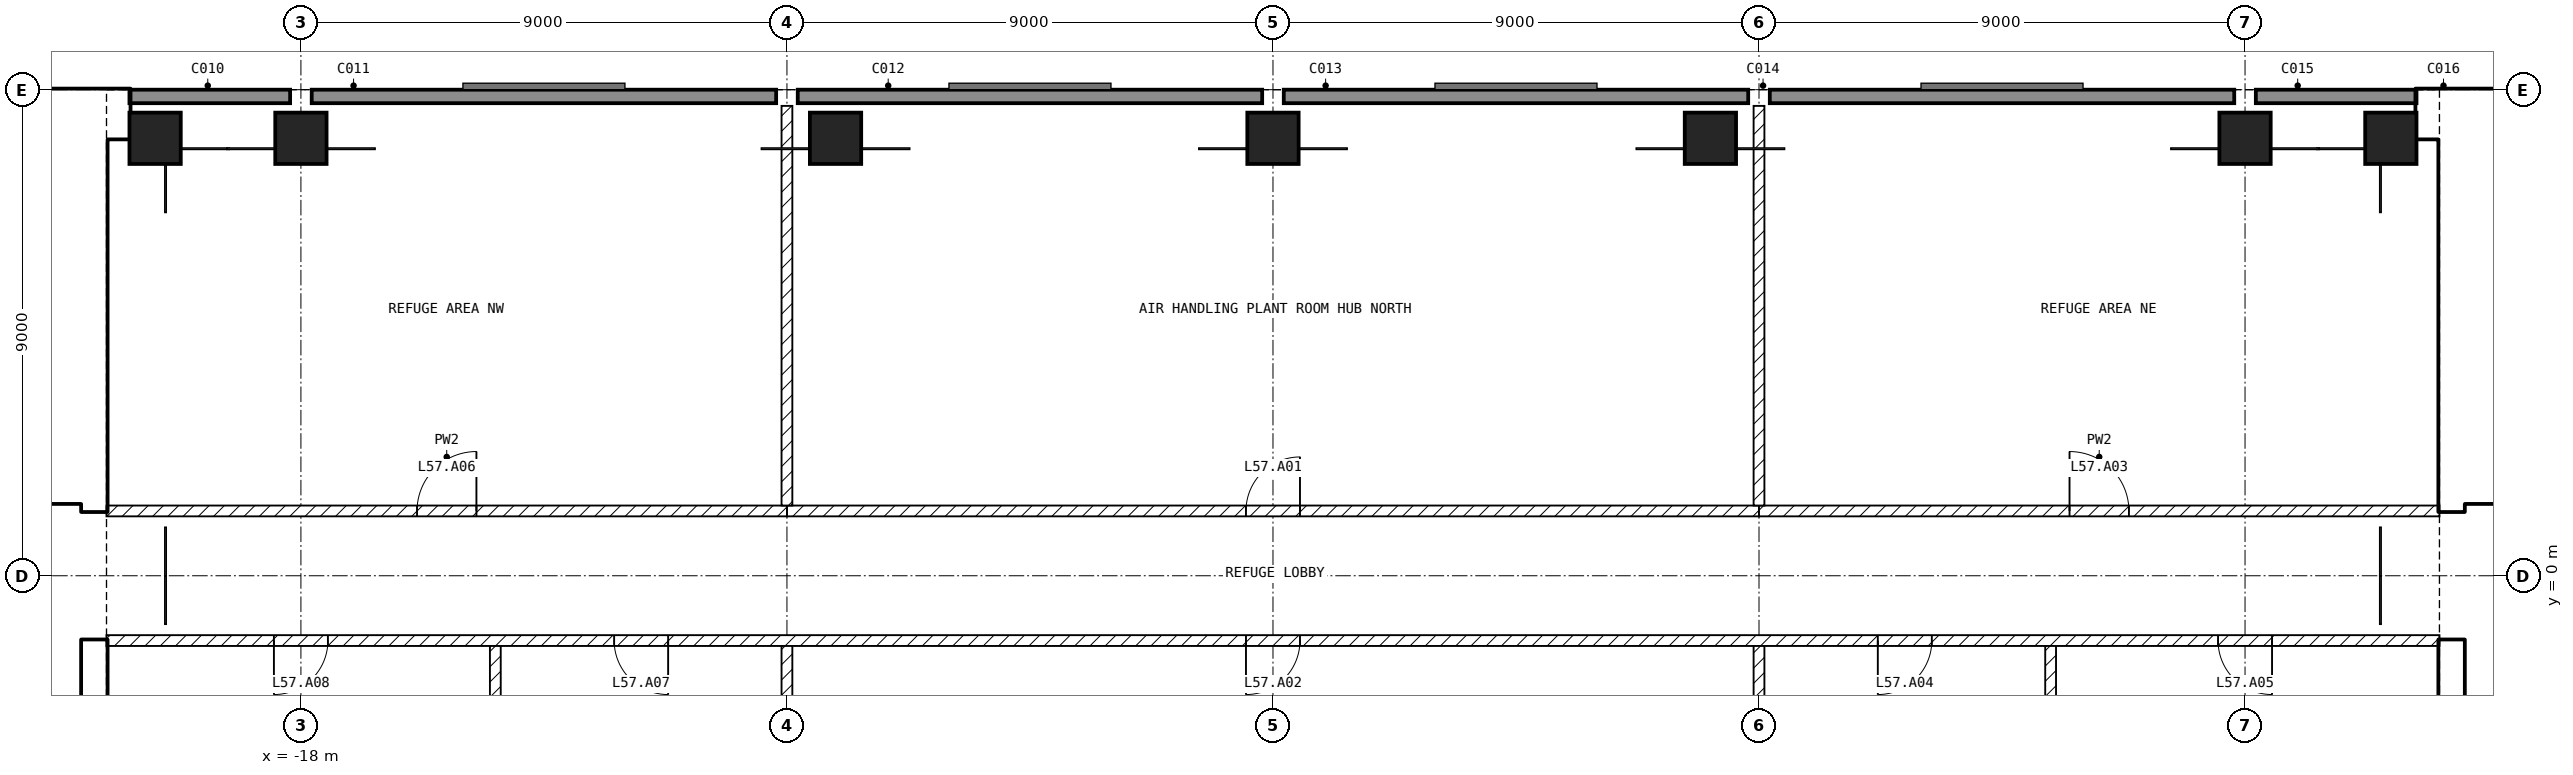
"""IFC4 building model, lengths in metres.
Left out: names, types, materials, properties, quantities, classifications, styles, units other than length and angle.
Written with IfcOpenShell. Run it as: python <this file> out.ifc"""

import sys

from ifc_helpers import new_model, si_unit, direction, frame, frame_2d, origin, origin_2d, place, context, subcontext, project, spatial, rectangle, extrude, element, fill, save


model = new_model("IFC4")
c1 = context("Model", 3, precision=1e-05, world=origin(), true_north=direction((0.0, 1.0)))
c2 = subcontext(c1, "Body", "Model", "MODEL_VIEW")
j1 = project(units=[si_unit("LENGTHUNIT", "METRE"), si_unit("PLANEANGLEUNIT", "RADIAN")], contexts=[c1])
p1 = place(None, origin())
s1 = spatial("IfcSite", under=j1, at=p1, CompositionType="ELEMENT")
p2 = place(p1, origin())
s2 = spatial("IfcBuilding", under=s1, at=p2, CompositionType="ELEMENT")
p3 = place(p2, frame((0.0, 0.0, 228.0)))
s3 = spatial("IfcBuildingStorey", under=s2, at=p3, CompositionType="ELEMENT", Elevation=228.0)
for number, where, z_axis, x_axis in (
    (1, (-20.7, 8.1, -0.45), (0.0, 0.0, 1.0), (1.0, 0.0, 0.0)),
    (2, (-18.0, 8.1, -0.45), (0.0, 0.0, 1.0), (1.0, 0.0, 0.0)),
    (3, (-8.1, 8.1, -0.45), (0.0, 0.0, 1.0), (1.0, 0.0, 0.0)),
    (4, (0.0, 8.1, -0.45), (0.0, 0.0, 1.0), (1.0, 0.0, 0.0)),
    (5, (8.1, 8.1, -0.45), (0.0, 0.0, 1.0), (1.0, 0.0, 0.0)),
    (6, (18.0, 8.1, -0.45), (0.0, 0.0, 1.0), (1.0, 0.0, 0.0)),
    (7, (20.7, 8.1, -0.45), (0.0, 0.0, 1.0), (1.0, 0.0, 0.0)),
):
    element("IfcColumn", number, at=place(p3, frame(where, z_axis=z_axis, x_axis=x_axis)), inside=s3, PredefinedType="COLUMN", context=c2, shape_type="SweptSolid", body=[
        extrude(rectangle(XDim=0.95, YDim=0.95, at=origin_2d()), origin(), (0.0, 0.0, 1.0), 4.7),
    ])
p4 = place(p3, frame((21.175, 8.875, 0.0), z_axis=(0.0, 0.0, 1.0), x_axis=(-1.0, 0.0, 0.0)))
e8 = element("IfcWall", 8, at=p4, inside=s3, PredefinedType="SOLIDWALL", context=c2, shape_type="SweptSolid", body=[
    extrude(rectangle(XDim=2.975, YDim=0.25, at=frame_2d((1.488, 0.0))), origin(), (0.0, 0.0, 1.0), 4.25),
])
for number, where, z_axis, x_axis in (
    (9, (17.8, 8.875, 0.0), (0.0, 0.0, 1.0), (-1.0, 0.0, 0.0)),
    (10, (8.8, 8.875, 0.0), (0.0, 0.0, 1.0), (-1.0, 0.0, 0.0)),
    (11, (-0.2, 8.875, 0.0), (0.0, 0.0, 1.0), (-1.0, 0.0, 0.0)),
    (12, (-9.2, 8.875, 0.0), (0.0, 0.0, 1.0), (-1.0, 0.0, 0.0)),
):
    element("IfcWall", number, at=place(p3, frame(where, z_axis=z_axis, x_axis=x_axis)), inside=s3, PredefinedType="SOLIDWALL", context=c2, shape_type="SweptSolid", body=[
        extrude(rectangle(XDim=8.6, YDim=0.25, at=frame_2d((4.3, 0.0))), origin(), (0.0, 0.0, 1.0), 4.25),
    ])
p5 = place(p3, frame((-18.2, 8.875, 0.0), z_axis=(0.0, 0.0, 1.0), x_axis=(-1.0, 0.0, 0.0)))
e13 = element("IfcWall", 13, at=p5, inside=s3, PredefinedType="SOLIDWALL", context=c2, shape_type="SweptSolid", body=[
    extrude(rectangle(XDim=2.975, YDim=0.25, at=frame_2d((1.488, 0.0))), origin(), (0.0, 0.0, 1.0), 4.25),
])
p6 = place(p3, frame((21.175, 8.55, 0.0), z_axis=(0.0, 0.0, 1.0), x_axis=(1.0, 0.0, 0.0)))
e14 = element("IfcWall", 14, at=p6, inside=s3, PredefinedType="SHEAR", context=c2, shape_type="SweptSolid", body=[
    extrude(rectangle(XDim=8.575, YDim=0.9, at=frame_2d((4.288, 0.0))), origin(), (0.0, 0.0, 1.0), 4.25),
])
for number, where, z_axis, x_axis in (
    (15, (21.825, -8.1, 0.0), (0.0, 0.0, 1.0), (0.0, 1.0, 0.0)),
    (16, (21.825, 1.2, 0.0), (0.0, 0.0, 1.0), (0.0, 1.0, 0.0)),
):
    element("IfcWall", number, at=place(p3, frame(where, z_axis=z_axis, x_axis=x_axis)), inside=s3, PredefinedType="SHEAR", context=c2, shape_type="SweptSolid", body=[
        extrude(rectangle(XDim=6.9, YDim=0.45, at=frame_2d((3.45, 0.0))), origin(), (0.0, 0.0, 1.0), 4.25),
    ])
p7 = place(p3, frame((22.05, 1.45, 0.0), z_axis=(0.0, 0.0, 1.0), x_axis=(1.0, 0.0, 0.0)))
e17 = element("IfcWall", 17, at=p7, inside=s3, PredefinedType="SOLIDWALL", context=c2, shape_type="SweptSolid", body=[
    extrude(rectangle(XDim=11.3, YDim=0.2, at=frame_2d((5.65, 0.0))), origin(), (0.0, 0.0, 1.0), 4.25),
])
p8 = place(p7, frame((0.75, 0.0, 0.0)))
e18 = element("IfcOpeningElement", 18, at=p8, cuts=e17, PredefinedType="OPENING", context=c2, shape_type="SweptSolid", body=[
    extrude(rectangle(XDim=1.0, YDim=2.1, at=frame_2d((0.5, 1.05))), frame((0.0, 0.11, 0.0), z_axis=(0.0, -1.0, 0.0), x_axis=(1.0, 0.0, 0.0)), (0.0, 0.0, 1.0), 0.22),
])
p9 = place(p7, frame((3.25, 0.0, 0.0)))
e19 = element("IfcOpeningElement", 19, at=p9, cuts=e17, PredefinedType="OPENING", context=c2, shape_type="SweptSolid", body=[
    extrude(rectangle(XDim=1.0, YDim=2.1, at=frame_2d((0.5, 1.05))), frame((0.0, 0.11, 0.0), z_axis=(0.0, -1.0, 0.0), x_axis=(1.0, 0.0, 0.0)), (0.0, 0.0, 1.0), 0.22),
])
p10 = place(p7, frame((9.225, 0.0, 0.0)))
e20 = element("IfcOpeningElement", 20, at=p10, cuts=e17, PredefinedType="OPENING", context=c2, shape_type="SweptSolid", body=[
    extrude(rectangle(XDim=0.9, YDim=2.1, at=frame_2d((0.45, 1.05))), frame((0.0, 0.11, 0.0), z_axis=(0.0, -1.0, 0.0), x_axis=(1.0, 0.0, 0.0)), (0.0, 0.0, 1.0), 0.22),
])
p11 = place(p3, frame((22.05, 5.15, 0.0), z_axis=(0.0, 0.0, 1.0), x_axis=(1.0, 0.0, 0.0)))
e21 = element("IfcWall", 21, at=p11, inside=s3, PredefinedType="SOLIDWALL", context=c2, shape_type="SweptSolid", body=[
    extrude(rectangle(XDim=6.3, YDim=0.2, at=frame_2d((3.15, 0.0))), origin(), (0.0, 0.0, 1.0), 4.25),
])
p12 = place(p11, frame((0.2, 0.0, 0.0)))
e22 = element("IfcOpeningElement", 22, at=p12, cuts=e21, PredefinedType="OPENING", context=c2, shape_type="SweptSolid", body=[
    extrude(rectangle(XDim=1.0, YDim=2.1, at=frame_2d((0.5, 1.05))), frame((0.0, 0.11, 0.0), z_axis=(0.0, -1.0, 0.0), x_axis=(1.0, 0.0, 0.0)), (0.0, 0.0, 1.0), 0.22),
])
p13 = place(p3, frame((-29.75, 8.55, 0.0), z_axis=(0.0, 0.0, 1.0), x_axis=(1.0, 0.0, 0.0)))
e23 = element("IfcWall", 23, at=p13, inside=s3, PredefinedType="SHEAR", context=c2, shape_type="SweptSolid", body=[
    extrude(rectangle(XDim=8.575, YDim=0.9, at=frame_2d((4.288, 0.0))), origin(), (0.0, 0.0, 1.0), 4.25),
])
for number, where, z_axis, x_axis in (
    (24, (-21.825, -8.1, 0.0), (0.0, 0.0, 1.0), (0.0, 1.0, 0.0)),
    (25, (-21.825, 1.2, 0.0), (0.0, 0.0, 1.0), (0.0, 1.0, 0.0)),
):
    element("IfcWall", number, at=place(p3, frame(where, z_axis=z_axis, x_axis=x_axis)), inside=s3, PredefinedType="SHEAR", context=c2, shape_type="SweptSolid", body=[
        extrude(rectangle(XDim=6.9, YDim=0.45, at=frame_2d((3.45, 0.0))), origin(), (0.0, 0.0, 1.0), 4.25),
    ])
p14 = place(p3, frame((-33.35, 1.45, 0.0), z_axis=(0.0, 0.0, 1.0), x_axis=(1.0, 0.0, 0.0)))
e26 = element("IfcWall", 26, at=p14, inside=s3, PredefinedType="SOLIDWALL", context=c2, shape_type="SweptSolid", body=[
    extrude(rectangle(XDim=11.3, YDim=0.2, at=frame_2d((5.65, 0.0))), origin(), (0.0, 0.0, 1.0), 4.25),
])
p15 = place(p14, frame((9.55, 0.0, 0.0)))
e27 = element("IfcOpeningElement", 27, at=p15, cuts=e26, PredefinedType="OPENING", context=c2, shape_type="SweptSolid", body=[
    extrude(rectangle(XDim=1.0, YDim=2.1, at=frame_2d((0.5, 1.05))), frame((0.0, 0.11, 0.0), z_axis=(0.0, -1.0, 0.0), x_axis=(1.0, 0.0, 0.0)), (0.0, 0.0, 1.0), 0.22),
])
p16 = place(p14, frame((7.05, 0.0, 0.0)))
e28 = element("IfcOpeningElement", 28, at=p16, cuts=e26, PredefinedType="OPENING", context=c2, shape_type="SweptSolid", body=[
    extrude(rectangle(XDim=1.0, YDim=2.1, at=frame_2d((0.5, 1.05))), frame((0.0, 0.11, 0.0), z_axis=(0.0, -1.0, 0.0), x_axis=(1.0, 0.0, 0.0)), (0.0, 0.0, 1.0), 0.22),
])
p17 = place(p14, frame((1.175, 0.0, 0.0)))
e29 = element("IfcOpeningElement", 29, at=p17, cuts=e26, PredefinedType="OPENING", context=c2, shape_type="SweptSolid", body=[
    extrude(rectangle(XDim=0.9, YDim=2.1, at=frame_2d((0.45, 1.05))), frame((0.0, 0.11, 0.0), z_axis=(0.0, -1.0, 0.0), x_axis=(1.0, 0.0, 0.0)), (0.0, 0.0, 1.0), 0.22),
])
p18 = place(p3, frame((-28.35, 5.15, 0.0), z_axis=(0.0, 0.0, 1.0), x_axis=(1.0, 0.0, 0.0)))
e30 = element("IfcWall", 30, at=p18, inside=s3, PredefinedType="SOLIDWALL", context=c2, shape_type="SweptSolid", body=[
    extrude(rectangle(XDim=6.3, YDim=0.2, at=frame_2d((3.15, 0.0))), origin(), (0.0, 0.0, 1.0), 4.25),
])
p19 = place(p18, frame((5.1, 0.0, 0.0)))
e31 = element("IfcOpeningElement", 31, at=p19, cuts=e30, PredefinedType="OPENING", context=c2, shape_type="SweptSolid", body=[
    extrude(rectangle(XDim=1.0, YDim=2.1, at=frame_2d((0.5, 1.05))), frame((0.0, 0.11, 0.0), z_axis=(0.0, -1.0, 0.0), x_axis=(1.0, 0.0, 0.0)), (0.0, 0.0, 1.0), 0.22),
])
p20 = place(p3, frame((-9.0, 1.2, 0.0), z_axis=(0.0, 0.0, 1.0), x_axis=(1.0, 0.0, 0.0)))
e32 = element("IfcWall", 32, at=p20, inside=s3, PredefinedType="PARTITIONING", context=c2, shape_type="SweptSolid", body=[
    extrude(rectangle(XDim=18.0, YDim=0.2, at=frame_2d((9.0, 0.0))), origin(), (0.0, 0.0, 1.0), 4.25),
])
p21 = place(p20, frame((8.5, 0.0, 0.0)))
e33 = element("IfcOpeningElement", 33, at=p21, cuts=e32, PredefinedType="OPENING", context=c2, shape_type="SweptSolid", body=[
    extrude(rectangle(XDim=1.0, YDim=2.1, at=frame_2d((0.5, 1.05))), frame((0.0, 0.11, 0.0), z_axis=(0.0, -1.0, 0.0), x_axis=(1.0, 0.0, 0.0)), (0.0, 0.0, 1.0), 0.22),
])
p22 = place(p3, frame((21.6, -1.2, 0.0), z_axis=(0.0, 0.0, 1.0), x_axis=(-1.0, 0.0, 0.0)))
e34 = element("IfcWall", 34, at=p22, inside=s3, PredefinedType="PARTITIONING", context=c2, shape_type="SweptSolid", body=[
    extrude(rectangle(XDim=43.2, YDim=0.2, at=frame_2d((21.6, 0.0))), origin(), (0.0, 0.0, 1.0), 4.25),
])
p23 = place(p22, frame((21.1, 0.0, 0.0)))
e35 = element("IfcOpeningElement", 35, at=p23, cuts=e34, PredefinedType="OPENING", context=c2, shape_type="SweptSolid", body=[
    extrude(rectangle(XDim=1.0, YDim=2.1, at=frame_2d((0.5, 1.05))), frame((0.0, 0.11, 0.0), z_axis=(0.0, -1.0, 0.0), x_axis=(1.0, 0.0, 0.0)), (0.0, 0.0, 1.0), 0.22),
])
p24 = place(p22, frame((9.4, 0.0, 0.0)))
e36 = element("IfcOpeningElement", 36, at=p24, cuts=e34, PredefinedType="OPENING", context=c2, shape_type="SweptSolid", body=[
    extrude(rectangle(XDim=1.0, YDim=2.1, at=frame_2d((0.5, 1.05))), frame((0.0, 0.11, 0.0), z_axis=(0.0, -1.0, 0.0), x_axis=(1.0, 0.0, 0.0)), (0.0, 0.0, 1.0), 0.22),
])
p25 = place(p22, frame((3.1, 0.0, 0.0)))
e37 = element("IfcOpeningElement", 37, at=p25, cuts=e34, PredefinedType="OPENING", context=c2, shape_type="SweptSolid", body=[
    extrude(rectangle(XDim=1.0, YDim=2.1, at=frame_2d((0.5, 1.05))), frame((0.0, 0.11, 0.0), z_axis=(0.0, -1.0, 0.0), x_axis=(1.0, 0.0, 0.0)), (0.0, 0.0, 1.0), 0.22),
])
p26 = place(p22, frame((32.8, 0.0, 0.0)))
e38 = element("IfcOpeningElement", 38, at=p26, cuts=e34, PredefinedType="OPENING", context=c2, shape_type="SweptSolid", body=[
    extrude(rectangle(XDim=1.0, YDim=2.1, at=frame_2d((0.5, 1.05))), frame((0.0, 0.11, 0.0), z_axis=(0.0, -1.0, 0.0), x_axis=(1.0, 0.0, 0.0)), (0.0, 0.0, 1.0), 0.22),
])
p27 = place(p22, frame((39.1, 0.0, 0.0)))
e39 = element("IfcOpeningElement", 39, at=p27, cuts=e34, PredefinedType="OPENING", context=c2, shape_type="SweptSolid", body=[
    extrude(rectangle(XDim=1.0, YDim=2.1, at=frame_2d((0.5, 1.05))), frame((0.0, 0.11, 0.0), z_axis=(0.0, -1.0, 0.0), x_axis=(1.0, 0.0, 0.0)), (0.0, 0.0, 1.0), 0.22),
])
p28 = place(p3, frame((9.0, 1.2, 0.0), z_axis=(0.0, 0.0, 1.0), x_axis=(1.0, 0.0, 0.0)))
e40 = element("IfcWall", 40, at=p28, inside=s3, PredefinedType="PARTITIONING", context=c2, shape_type="SweptSolid", body=[
    extrude(rectangle(XDim=12.6, YDim=0.2, at=frame_2d((6.3, 0.0))), origin(), (0.0, 0.0, 1.0), 4.25),
])
p29 = place(p28, frame((5.75, 0.0, 0.0)))
e41 = element("IfcOpeningElement", 41, at=p29, cuts=e40, PredefinedType="OPENING", context=c2, shape_type="SweptSolid", body=[
    extrude(rectangle(XDim=1.1, YDim=2.1, at=frame_2d((0.55, 1.05))), frame((0.0, 0.11, 0.0), z_axis=(0.0, -1.0, 0.0), x_axis=(1.0, 0.0, 0.0)), (0.0, 0.0, 1.0), 0.22),
])
p30 = place(p3, frame((-21.6, 1.2, 0.0), z_axis=(0.0, 0.0, 1.0), x_axis=(1.0, 0.0, 0.0)))
e42 = element("IfcWall", 42, at=p30, inside=s3, PredefinedType="PARTITIONING", context=c2, shape_type="SweptSolid", body=[
    extrude(rectangle(XDim=12.6, YDim=0.2, at=frame_2d((6.3, 0.0))), origin(), (0.0, 0.0, 1.0), 4.25),
])
p31 = place(p30, frame((5.75, 0.0, 0.0)))
e43 = element("IfcOpeningElement", 43, at=p31, cuts=e42, PredefinedType="OPENING", context=c2, shape_type="SweptSolid", body=[
    extrude(rectangle(XDim=1.1, YDim=2.1, at=frame_2d((0.55, 1.05))), frame((0.0, 0.11, 0.0), z_axis=(0.0, -1.0, 0.0), x_axis=(1.0, 0.0, 0.0)), (0.0, 0.0, 1.0), 0.22),
])
for number, where, z_axis, x_axis in (
    (44, (9.0, 8.7, 0.0), (0.0, 0.0, 1.0), (0.0, -1.0, 0.0)),
    (45, (-9.0, 1.3, 0.0), (0.0, 0.0, 1.0), (0.0, 1.0, 0.0)),
):
    element("IfcWall", number, at=place(p3, frame(where, z_axis=z_axis, x_axis=x_axis)), inside=s3, PredefinedType="PARTITIONING", context=c2, shape_type="SweptSolid", body=[
        extrude(rectangle(XDim=7.4, YDim=0.2, at=frame_2d((3.7, 0.0))), origin(), (0.0, 0.0, 1.0), 4.25),
    ])
for number, where, z_axis, x_axis in (
    (46, (9.0, -1.3, 0.0), (0.0, 0.0, 1.0), (0.0, -1.0, 0.0)),
    (47, (-9.0, -8.9, 0.0), (0.0, 0.0, 1.0), (0.0, 1.0, 0.0)),
    (48, (14.4, -1.3, 0.0), (0.0, 0.0, 1.0), (0.0, -1.0, 0.0)),
    (49, (-14.4, -8.9, 0.0), (0.0, 0.0, 1.0), (0.0, 1.0, 0.0)),
):
    element("IfcWall", number, at=place(p3, frame(where, z_axis=z_axis, x_axis=x_axis)), inside=s3, PredefinedType="PARTITIONING", context=c2, shape_type="SweptSolid", body=[
        extrude(rectangle(XDim=7.6, YDim=0.2, at=frame_2d((3.8, 0.0))), origin(), (0.0, 0.0, 1.0), 4.25),
    ])
p32 = place(p12, origin())
e50 = element("IfcDoor", 50, at=p32, inside=s3, OperationType="SINGLE_SWING_LEFT", PredefinedType="DOOR", context=c2, shape_type="SweptSolid", body=[
    extrude(rectangle(XDim=1.0, YDim=2.1, at=frame_2d((0.5, 1.05))), frame((0.0, 0.025, 0.0), z_axis=(0.0, -1.0, 0.0), x_axis=(1.0, 0.0, 0.0)), (0.0, 0.0, 1.0), 0.05),
])
fill(e22, e50)
p33 = place(p19, origin())
e51 = element("IfcDoor", 51, at=p33, inside=s3, OperationType="SINGLE_SWING_LEFT", PredefinedType="DOOR", context=c2, shape_type="SweptSolid", body=[
    extrude(rectangle(XDim=1.0, YDim=2.1, at=frame_2d((0.5, 1.05))), frame((0.0, 0.025, 0.0), z_axis=(0.0, -1.0, 0.0), x_axis=(1.0, 0.0, 0.0)), (0.0, 0.0, 1.0), 0.05),
])
fill(e31, e51)
p34 = place(p21, origin())
e52 = element("IfcDoor", 52, at=p34, inside=s3, OperationType="SINGLE_SWING_RIGHT", PredefinedType="DOOR", context=c2, shape_type="SweptSolid", body=[
    extrude(rectangle(XDim=1.0, YDim=2.1, at=frame_2d((0.5, 1.05))), frame((0.0, 0.025, 0.0), z_axis=(0.0, -1.0, 0.0), x_axis=(1.0, 0.0, 0.0)), (0.0, 0.0, 1.0), 0.05),
])
fill(e33, e52)
p35 = place(p23, origin())
e53 = element("IfcDoor", 53, at=p35, inside=s3, OperationType="SINGLE_SWING_RIGHT", PredefinedType="DOOR", context=c2, shape_type="SweptSolid", body=[
    extrude(rectangle(XDim=1.0, YDim=2.1, at=frame_2d((0.5, 1.05))), frame((0.0, 0.025, 0.0), z_axis=(0.0, -1.0, 0.0), x_axis=(1.0, 0.0, 0.0)), (0.0, 0.0, 1.0), 0.05),
])
fill(e35, e53)
p36 = place(p29, origin())
e54 = element("IfcDoor", 54, at=p36, inside=s3, OperationType="SINGLE_SWING_LEFT", PredefinedType="DOOR", context=c2, shape_type="SweptSolid", body=[
    extrude(rectangle(XDim=1.1, YDim=2.1, at=frame_2d((0.55, 1.05))), frame((0.0, 0.025, 0.0), z_axis=(0.0, -1.0, 0.0), x_axis=(1.0, 0.0, 0.0)), (0.0, 0.0, 1.0), 0.05),
])
fill(e41, e54)
p37 = place(p24, origin())
e55 = element("IfcDoor", 55, at=p37, inside=s3, OperationType="SINGLE_SWING_RIGHT", PredefinedType="DOOR", context=c2, shape_type="SweptSolid", body=[
    extrude(rectangle(XDim=1.0, YDim=2.1, at=frame_2d((0.5, 1.05))), frame((0.0, 0.025, 0.0), z_axis=(0.0, -1.0, 0.0), x_axis=(1.0, 0.0, 0.0)), (0.0, 0.0, 1.0), 0.05),
])
fill(e36, e55)
p38 = place(p25, origin())
e56 = element("IfcDoor", 56, at=p38, inside=s3, OperationType="SINGLE_SWING_LEFT", PredefinedType="DOOR", context=c2, shape_type="SweptSolid", body=[
    extrude(rectangle(XDim=1.0, YDim=2.1, at=frame_2d((0.5, 1.05))), frame((0.0, 0.025, 0.0), z_axis=(0.0, -1.0, 0.0), x_axis=(1.0, 0.0, 0.0)), (0.0, 0.0, 1.0), 0.05),
])
fill(e37, e56)
p39 = place(p31, origin())
e57 = element("IfcDoor", 57, at=p39, inside=s3, OperationType="SINGLE_SWING_RIGHT", PredefinedType="DOOR", context=c2, shape_type="SweptSolid", body=[
    extrude(rectangle(XDim=1.1, YDim=2.1, at=frame_2d((0.55, 1.05))), frame((0.0, 0.025, 0.0), z_axis=(0.0, -1.0, 0.0), x_axis=(1.0, 0.0, 0.0)), (0.0, 0.0, 1.0), 0.05),
])
fill(e43, e57)
p40 = place(p26, origin())
e58 = element("IfcDoor", 58, at=p40, inside=s3, OperationType="SINGLE_SWING_LEFT", PredefinedType="DOOR", context=c2, shape_type="SweptSolid", body=[
    extrude(rectangle(XDim=1.0, YDim=2.1, at=frame_2d((0.5, 1.05))), frame((0.0, 0.025, 0.0), z_axis=(0.0, -1.0, 0.0), x_axis=(1.0, 0.0, 0.0)), (0.0, 0.0, 1.0), 0.05),
])
fill(e38, e58)
p41 = place(p27, origin())
e59 = element("IfcDoor", 59, at=p41, inside=s3, OperationType="SINGLE_SWING_RIGHT", PredefinedType="DOOR", context=c2, shape_type="SweptSolid", body=[
    extrude(rectangle(XDim=1.0, YDim=2.1, at=frame_2d((0.5, 1.05))), frame((0.0, 0.025, 0.0), z_axis=(0.0, -1.0, 0.0), x_axis=(1.0, 0.0, 0.0)), (0.0, 0.0, 1.0), 0.05),
])
fill(e39, e59)
save(model, sys.argv[1])
